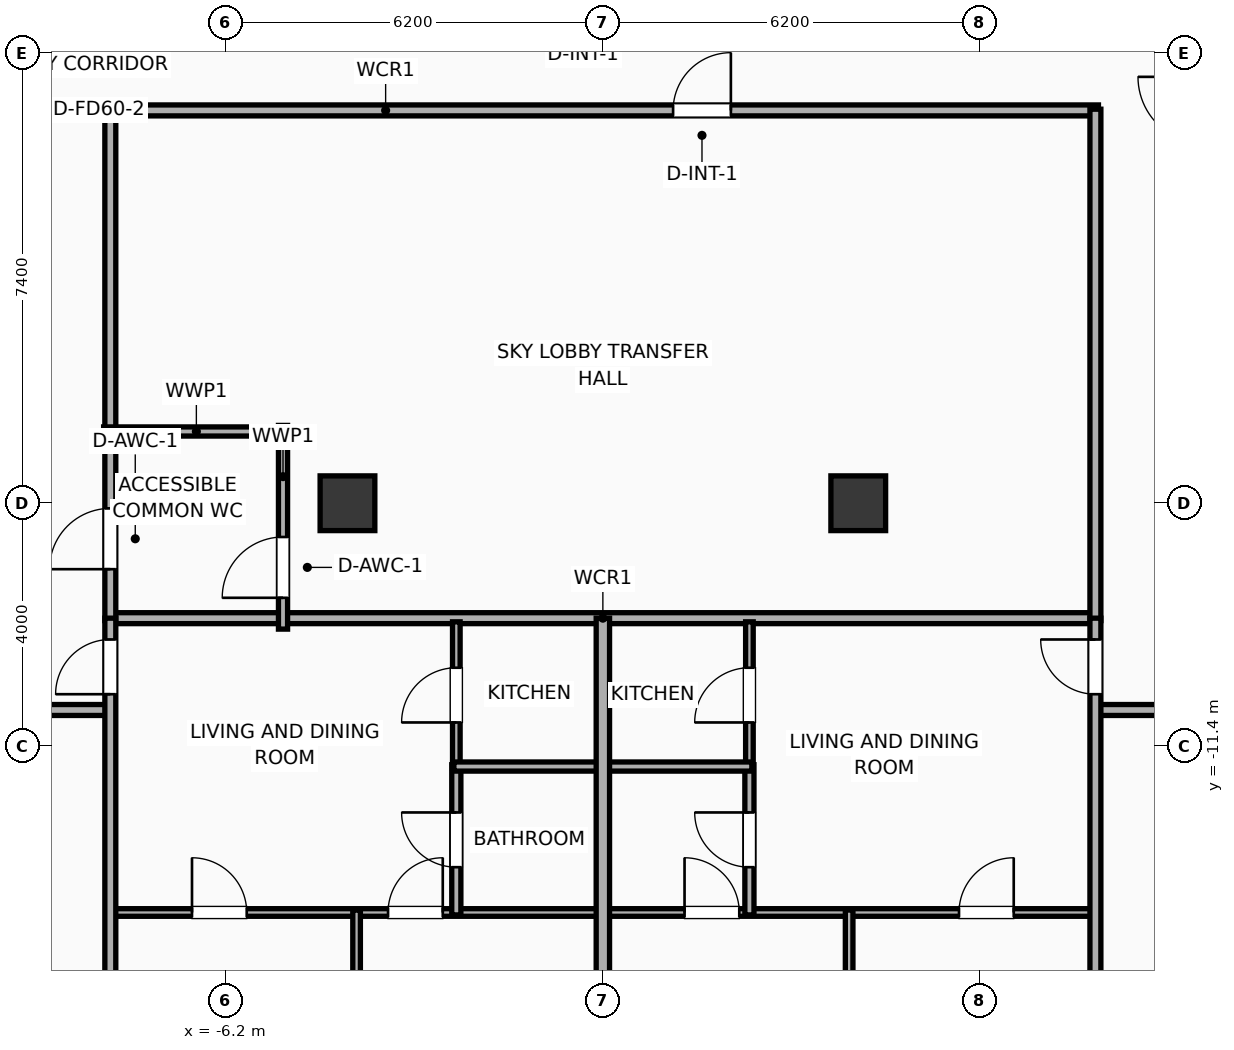
"""IFC4 building model, lengths in metres.
Left out: names, types, materials, properties, quantities, classifications, styles, units other than length and angle.
Written with IfcOpenShell. Run it as: python <this file> out.ifc"""

import sys

from ifc_helpers import new_model, si_unit, direction, frame, frame_2d, origin, origin_2d, place, context, subcontext, project, spatial, rectangle, extrude, element, fill, save


model = new_model("IFC4")
c1 = context("Model", 3, precision=1e-05, world=origin(), true_north=direction((0.0, 1.0)))
c2 = subcontext(c1, "Body", "Model", "MODEL_VIEW")
j1 = project(units=[si_unit("LENGTHUNIT", "METRE"), si_unit("PLANEANGLEUNIT", "RADIAN")], contexts=[c1])
p1 = place(None, origin())
s1 = spatial("IfcSite", under=j1, at=p1, CompositionType="ELEMENT")
p2 = place(p1, origin())
s2 = spatial("IfcBuilding", under=s1, at=p2, CompositionType="ELEMENT")
p3 = place(p2, frame((0.0, 0.0, 140.4)))
s3 = spatial("IfcBuildingStorey", under=s2, at=p3, CompositionType="ELEMENT", Elevation=140.4)
for number, where, z_axis, x_axis in (
    (1, (-4.2, -7.4, 0.0), (0.0, 0.0, 1.0), (1.0, 0.0, 0.0)),
    (2, (4.2, -7.4, 0.0), (0.0, 0.0, 1.0), (1.0, 0.0, 0.0)),
):
    element("IfcColumn", number, at=place(p3, frame(where, z_axis=z_axis, x_axis=x_axis)), inside=s3, PredefinedType="COLUMN", context=c2, shape_type="SweptSolid", body=[
        extrude(rectangle(XDim=0.9, YDim=0.9, at=origin_2d()), origin(), (0.0, 0.0, 1.0), 3.9),
    ])
p4 = place(p3, frame((-8.15, -9.29, 0.0), z_axis=(0.0, 0.0, 1.0), x_axis=(1.0, 0.0, 0.0)))
e3 = element("IfcWall", 3, at=p4, inside=s3, PredefinedType="PARTITIONING", context=c2, shape_type="SweptSolid", body=[
    extrude(rectangle(XDim=16.3, YDim=0.18, at=frame_2d((8.15, 0.0))), origin(), (0.0, 0.0, 1.0), 3.65),
])
p5 = place(p3, frame((-8.15, -0.94, 0.0), z_axis=(0.0, 0.0, 1.0), x_axis=(1.0, 0.0, 0.0)))
e4 = element("IfcWall", 4, at=p5, inside=s3, PredefinedType="PARTITIONING", context=c2, shape_type="SweptSolid", body=[
    extrude(rectangle(XDim=16.3, YDim=0.18, at=frame_2d((8.15, 0.0))), origin(), (0.0, 0.0, 1.0), 3.65),
])
p6 = place(p5, frame((9.305, 0.0, 0.0)))
e5 = element("IfcOpeningElement", 5, at=p6, cuts=e4, PredefinedType="OPENING", context=c2, shape_type="SweptSolid", body=[
    extrude(rectangle(XDim=0.95, YDim=2.05, at=frame_2d((0.475, 1.025))), frame((0.0, 0.1, 0.0), z_axis=(0.0, -1.0, 0.0), x_axis=(1.0, 0.0, 0.0)), (0.0, 0.0, 1.0), 0.2),
])
p7 = place(p3, frame((-8.1, -9.33, 0.0), z_axis=(0.0, 0.0, 1.0), x_axis=(0.0, 1.0, 0.0)))
e6 = element("IfcWall", 6, at=p7, inside=s3, PredefinedType="PARTITIONING", context=c2, shape_type="SweptSolid", body=[
    extrude(rectangle(XDim=8.41, YDim=0.18, at=frame_2d((4.205, 0.0))), origin(), (0.0, 0.0, 1.0), 3.65),
])
p8 = place(p7, frame((0.846, 0.0, 0.0)))
e7 = element("IfcOpeningElement", 7, at=p8, cuts=e6, PredefinedType="OPENING", context=c2, shape_type="SweptSolid", body=[
    extrude(rectangle(XDim=1.0, YDim=2.05, at=frame_2d((0.5, 1.025))), frame((0.0, 0.1, 0.0), z_axis=(0.0, -1.0, 0.0), x_axis=(1.0, 0.0, 0.0)), (0.0, 0.0, 1.0), 0.2),
])
p9 = place(p3, frame((8.1, -9.33, 0.0), z_axis=(0.0, 0.0, 1.0), x_axis=(0.0, 1.0, 0.0)))
e8 = element("IfcWall", 8, at=p9, inside=s3, PredefinedType="PARTITIONING", context=c2, shape_type="SweptSolid", body=[
    extrude(rectangle(XDim=8.41, YDim=0.18, at=frame_2d((4.205, 0.0))), origin(), (0.0, 0.0, 1.0), 3.65),
])
p10 = place(p3, frame((-5.26, -9.47, 0.0), z_axis=(0.0, 0.0, 1.0), x_axis=(0.0, 1.0, 0.0)))
e9 = element("IfcWall", 9, at=p10, inside=s3, PredefinedType="PLUMBINGWALL", context=c2, shape_type="SweptSolid", body=[
    extrude(rectangle(XDim=3.35, YDim=0.15, at=frame_2d((1.675, 0.0))), origin(), (0.0, 0.0, 1.0), 3.65),
])
p11 = place(p10, frame((0.515, 0.0, 0.0)))
e10 = element("IfcOpeningElement", 10, at=p11, cuts=e9, PredefinedType="OPENING", context=c2, shape_type="SweptSolid", body=[
    extrude(rectangle(XDim=1.0, YDim=2.05, at=frame_2d((0.5, 1.025))), frame((0.0, 0.085, 0.0), z_axis=(0.0, -1.0, 0.0), x_axis=(1.0, 0.0, 0.0)), (0.0, 0.0, 1.0), 0.17),
])
p12 = place(p3, frame((-8.21, -6.22, 0.0), z_axis=(0.0, 0.0, 1.0), x_axis=(1.0, 0.0, 0.0)))
e11 = element("IfcWall", 11, at=p12, inside=s3, PredefinedType="PLUMBINGWALL", context=c2, shape_type="SweptSolid", body=[
    extrude(rectangle(XDim=3.05, YDim=0.15, at=frame_2d((1.525, 0.0))), origin(), (0.0, 0.0, 1.0), 3.65),
])
p13 = place(p3, frame((-20.0, -10.8, 0.0), z_axis=(0.0, 0.0, 1.0), x_axis=(1.0, 0.0, 0.0)))
e12 = element("IfcWall", 12, at=p13, inside=s3, PredefinedType="PARTITIONING", context=c2, shape_type="SweptSolid", body=[
    extrude(rectangle(XDim=11.92, YDim=0.18, at=frame_2d((5.96, 0.0))), origin(), (0.0, 0.0, 1.0), 3.65),
])
p14 = place(p13, frame((2.705, 0.0, 0.0)))
e13 = element("IfcOpeningElement", 13, at=p14, cuts=e12, PredefinedType="OPENING", context=c2, shape_type="SweptSolid", body=[
    extrude(rectangle(XDim=0.9, YDim=2.05, at=frame_2d((0.45, 1.025))), frame((0.0, 0.1, 0.0), z_axis=(0.0, -1.0, 0.0), x_axis=(1.0, 0.0, 0.0)), (0.0, 0.0, 1.0), 0.2),
])
p15 = place(p13, frame((9.618, 0.0, 0.0)))
e14 = element("IfcOpeningElement", 14, at=p15, cuts=e12, PredefinedType="OPENING", context=c2, shape_type="SweptSolid", body=[
    extrude(rectangle(XDim=1.15, YDim=2.05, at=frame_2d((0.575, 1.025))), frame((0.0, 0.1, 0.0), z_axis=(0.0, -1.0, 0.0), x_axis=(1.0, 0.0, 0.0)), (0.0, 0.0, 1.0), 0.2),
])
p16 = place(p3, frame((8.08, -10.8, 0.0), z_axis=(0.0, 0.0, 1.0), x_axis=(1.0, 0.0, 0.0)))
e15 = element("IfcWall", 15, at=p16, inside=s3, PredefinedType="PARTITIONING", context=c2, shape_type="SweptSolid", body=[
    extrude(rectangle(XDim=11.92, YDim=0.18, at=frame_2d((5.96, 0.0))), origin(), (0.0, 0.0, 1.0), 3.65),
])
p17 = place(p16, frame((1.251, 0.0, 0.0)))
e16 = element("IfcOpeningElement", 16, at=p17, cuts=e15, PredefinedType="OPENING", context=c2, shape_type="SweptSolid", body=[
    extrude(rectangle(XDim=1.15, YDim=2.05, at=frame_2d((0.575, 1.025))), frame((0.0, 0.1, 0.0), z_axis=(0.0, -1.0, 0.0), x_axis=(1.0, 0.0, 0.0)), (0.0, 0.0, 1.0), 0.2),
])
p18 = place(p16, frame((7.244, 0.0, 0.0)))
e17 = element("IfcOpeningElement", 17, at=p18, cuts=e15, PredefinedType="OPENING", context=c2, shape_type="SweptSolid", body=[
    extrude(rectangle(XDim=1.15, YDim=2.05, at=frame_2d((0.575, 1.025))), frame((0.0, 0.1, 0.0), z_axis=(0.0, -1.0, 0.0), x_axis=(1.0, 0.0, 0.0)), (0.0, 0.0, 1.0), 0.2),
])
p19 = place(p3, frame((-8.08, -14.13, 0.0), z_axis=(0.0, 0.0, 1.0), x_axis=(1.0, 0.0, 0.0)))
e18 = element("IfcWall", 18, at=p19, inside=s3, PredefinedType="PARTITIONING", context=c2, shape_type="SweptSolid", body=[
    extrude(rectangle(XDim=8.06, YDim=0.125, at=frame_2d((4.03, 0.0))), origin(), (0.0, 0.0, 1.0), 3.65),
])
p20 = place(p19, frame((1.323, 0.0, 0.0)))
e19 = element("IfcOpeningElement", 19, at=p20, cuts=e18, PredefinedType="OPENING", context=c2, shape_type="SweptSolid", body=[
    extrude(rectangle(XDim=0.9, YDim=2.05, at=frame_2d((0.45, 1.025))), frame((0.0, 0.073, 0.0), z_axis=(0.0, -1.0, 0.0), x_axis=(1.0, 0.0, 0.0)), (0.0, 0.0, 1.0), 0.145),
])
p21 = place(p19, frame((4.547, 0.0, 0.0)))
e20 = element("IfcOpeningElement", 20, at=p21, cuts=e18, PredefinedType="OPENING", context=c2, shape_type="SweptSolid", body=[
    extrude(rectangle(XDim=0.9, YDim=2.05, at=frame_2d((0.45, 1.025))), frame((0.0, 0.073, 0.0), z_axis=(0.0, -1.0, 0.0), x_axis=(1.0, 0.0, 0.0)), (0.0, 0.0, 1.0), 0.145),
])
p22 = place(p3, frame((-2.41, -11.76, 0.0), z_axis=(0.0, 0.0, 1.0), x_axis=(0.0, 1.0, 0.0)))
e21 = element("IfcWall", 21, at=p22, inside=s3, PredefinedType="PARTITIONING", context=c2, shape_type="SweptSolid", body=[
    extrude(rectangle(XDim=2.41, YDim=0.125, at=frame_2d((1.205, 0.0))), origin(), (0.0, 0.0, 1.0), 3.65),
])
p23 = place(p22, frame((0.755, 0.0, 0.0)))
e22 = element("IfcOpeningElement", 22, at=p23, cuts=e21, PredefinedType="OPENING", context=c2, shape_type="SweptSolid", body=[
    extrude(rectangle(XDim=0.9, YDim=2.05, at=frame_2d((0.45, 1.025))), frame((0.0, 0.073, 0.0), z_axis=(0.0, -1.0, 0.0), x_axis=(1.0, 0.0, 0.0)), (0.0, 0.0, 1.0), 0.145),
])
p24 = place(p3, frame((-2.41, -14.17, 0.0), z_axis=(0.0, 0.0, 1.0), x_axis=(0.0, 1.0, 0.0)))
e23 = element("IfcWall", 23, at=p24, inside=s3, PredefinedType="PLUMBINGWALL", context=c2, shape_type="SweptSolid", body=[
    extrude(rectangle(XDim=2.47, YDim=0.15, at=frame_2d((1.235, 0.0))), origin(), (0.0, 0.0, 1.0), 3.65),
])
p25 = place(p24, frame((0.785, 0.0, 0.0)))
e24 = element("IfcOpeningElement", 24, at=p25, cuts=e23, PredefinedType="OPENING", context=c2, shape_type="SweptSolid", body=[
    extrude(rectangle(XDim=0.9, YDim=2.05, at=frame_2d((0.45, 1.025))), frame((0.0, 0.085, 0.0), z_axis=(0.0, -1.0, 0.0), x_axis=(1.0, 0.0, 0.0)), (0.0, 0.0, 1.0), 0.17),
])
p26 = place(p3, frame((-2.45, -11.73, 0.0), z_axis=(0.0, 0.0, 1.0), x_axis=(1.0, 0.0, 0.0)))
e25 = element("IfcWall", 25, at=p26, inside=s3, PredefinedType="PLUMBINGWALL", context=c2, shape_type="SweptSolid", body=[
    extrude(rectangle(XDim=2.43, YDim=0.15, at=frame_2d((1.215, 0.0))), origin(), (0.0, 0.0, 1.0), 3.65),
])
p27 = place(p3, frame((-4.05, -21.031, 0.0), z_axis=(0.0, 0.0, 1.0), x_axis=(0.0, 1.0, 0.0)))
e26 = element("IfcWall", 26, at=p27, inside=s3, PredefinedType="PARTITIONING", context=c2, shape_type="SweptSolid", body=[
    extrude(rectangle(XDim=6.941, YDim=0.125, at=frame_2d((3.47, 0.0))), origin(), (0.0, 0.0, 1.0), 3.65),
])
p28 = place(p3, frame((-8.1, -21.456, 0.0), z_axis=(0.0, 0.0, 1.0), x_axis=(0.0, 1.0, 0.0)))
e27 = element("IfcWall", 27, at=p28, inside=s3, PredefinedType="PARTITIONING", context=c2, shape_type="SweptSolid", body=[
    extrude(rectangle(XDim=12.166, YDim=0.18, at=frame_2d((6.083, 0.0))), origin(), (0.0, 0.0, 1.0), 3.65),
])
p29 = place(p28, frame((10.916, 0.0, 0.0)))
e28 = element("IfcOpeningElement", 28, at=p29, cuts=e27, PredefinedType="OPENING", context=c2, shape_type="SweptSolid", body=[
    extrude(rectangle(XDim=0.9, YDim=2.05, at=frame_2d((0.45, 1.025))), frame((0.0, 0.1, 0.0), z_axis=(0.0, -1.0, 0.0), x_axis=(1.0, 0.0, 0.0)), (0.0, 0.0, 1.0), 0.2),
])
p30 = place(p3, frame((0.02, -14.13, 0.0), z_axis=(0.0, 0.0, 1.0), x_axis=(1.0, 0.0, 0.0)))
e29 = element("IfcWall", 29, at=p30, inside=s3, PredefinedType="PARTITIONING", context=c2, shape_type="SweptSolid", body=[
    extrude(rectangle(XDim=8.06, YDim=0.125, at=frame_2d((4.03, 0.0))), origin(), (0.0, 0.0, 1.0), 3.65),
])
p31 = place(p30, frame((1.323, 0.0, 0.0)))
e30 = element("IfcOpeningElement", 30, at=p31, cuts=e29, PredefinedType="OPENING", context=c2, shape_type="SweptSolid", body=[
    extrude(rectangle(XDim=0.9, YDim=2.05, at=frame_2d((0.45, 1.025))), frame((0.0, 0.073, 0.0), z_axis=(0.0, -1.0, 0.0), x_axis=(1.0, 0.0, 0.0)), (0.0, 0.0, 1.0), 0.145),
])
p32 = place(p30, frame((5.837, 0.0, 0.0)))
e31 = element("IfcOpeningElement", 31, at=p32, cuts=e29, PredefinedType="OPENING", context=c2, shape_type="SweptSolid", body=[
    extrude(rectangle(XDim=0.9, YDim=2.05, at=frame_2d((0.45, 1.025))), frame((0.0, 0.073, 0.0), z_axis=(0.0, -1.0, 0.0), x_axis=(1.0, 0.0, 0.0)), (0.0, 0.0, 1.0), 0.145),
])
p33 = place(p3, frame((2.41, -11.76, 0.0), z_axis=(0.0, 0.0, 1.0), x_axis=(0.0, 1.0, 0.0)))
e32 = element("IfcWall", 32, at=p33, inside=s3, PredefinedType="PARTITIONING", context=c2, shape_type="SweptSolid", body=[
    extrude(rectangle(XDim=2.41, YDim=0.125, at=frame_2d((1.205, 0.0))), origin(), (0.0, 0.0, 1.0), 3.65),
])
p34 = place(p33, frame((0.755, 0.0, 0.0)))
e33 = element("IfcOpeningElement", 33, at=p34, cuts=e32, PredefinedType="OPENING", context=c2, shape_type="SweptSolid", body=[
    extrude(rectangle(XDim=0.9, YDim=2.05, at=frame_2d((0.45, 1.025))), frame((0.0, 0.073, 0.0), z_axis=(0.0, -1.0, 0.0), x_axis=(1.0, 0.0, 0.0)), (0.0, 0.0, 1.0), 0.145),
])
p35 = place(p3, frame((2.41, -14.17, 0.0), z_axis=(0.0, 0.0, 1.0), x_axis=(0.0, 1.0, 0.0)))
e34 = element("IfcWall", 34, at=p35, inside=s3, PredefinedType="PLUMBINGWALL", context=c2, shape_type="SweptSolid", body=[
    extrude(rectangle(XDim=2.47, YDim=0.15, at=frame_2d((1.235, 0.0))), origin(), (0.0, 0.0, 1.0), 3.65),
])
p36 = place(p35, frame((0.785, 0.0, 0.0)))
e35 = element("IfcOpeningElement", 35, at=p36, cuts=e34, PredefinedType="OPENING", context=c2, shape_type="SweptSolid", body=[
    extrude(rectangle(XDim=0.9, YDim=2.05, at=frame_2d((0.45, 1.025))), frame((0.0, 0.085, 0.0), z_axis=(0.0, -1.0, 0.0), x_axis=(1.0, 0.0, 0.0)), (0.0, 0.0, 1.0), 0.17),
])
p37 = place(p3, frame((0.02, -11.73, 0.0), z_axis=(0.0, 0.0, 1.0), x_axis=(1.0, 0.0, 0.0)))
e36 = element("IfcWall", 36, at=p37, inside=s3, PredefinedType="PLUMBINGWALL", context=c2, shape_type="SweptSolid", body=[
    extrude(rectangle(XDim=2.43, YDim=0.15, at=frame_2d((1.215, 0.0))), origin(), (0.0, 0.0, 1.0), 3.65),
])
p38 = place(p3, frame((4.05, -20.179, 0.0), z_axis=(0.0, 0.0, 1.0), x_axis=(0.0, 1.0, 0.0)))
e37 = element("IfcWall", 37, at=p38, inside=s3, PredefinedType="PARTITIONING", context=c2, shape_type="SweptSolid", body=[
    extrude(rectangle(XDim=6.089, YDim=0.125, at=frame_2d((3.045, 0.0))), origin(), (0.0, 0.0, 1.0), 2.54),
])
p39 = place(p3, frame((8.1, -19.754, 0.0), z_axis=(0.0, 0.0, 1.0), x_axis=(0.0, 1.0, 0.0)))
e38 = element("IfcWall", 38, at=p39, inside=s3, PredefinedType="PARTITIONING", context=c2, shape_type="SweptSolid", body=[
    extrude(rectangle(XDim=10.464, YDim=0.18, at=frame_2d((5.232, 0.0))), origin(), (0.0, 0.0, 1.0), 3.65),
])
p40 = place(p39, frame((9.213, 0.0, 0.0)))
e39 = element("IfcOpeningElement", 39, at=p40, cuts=e38, PredefinedType="OPENING", context=c2, shape_type="SweptSolid", body=[
    extrude(rectangle(XDim=0.9, YDim=2.05, at=frame_2d((0.45, 1.025))), frame((0.0, 0.1, 0.0), z_axis=(0.0, -1.0, 0.0), x_axis=(1.0, 0.0, 0.0)), (0.0, 0.0, 1.0), 0.2),
])
p41 = place(p3, frame((0.0, -20.605, 0.0), z_axis=(0.0, 0.0, 1.0), x_axis=(0.0, 1.0, 0.0)))
e40 = element("IfcWall", 40, at=p41, inside=s3, PredefinedType="PARTITIONING", context=c2, shape_type="SweptSolid", body=[
    extrude(rectangle(XDim=11.315, YDim=0.22, at=frame_2d((5.657, 0.0))), origin(), (0.0, 0.0, 1.0), 3.65),
])
p42 = place(p6, origin())
e41 = element("IfcDoor", 41, at=p42, inside=s3, OperationType="SINGLE_SWING_RIGHT", PredefinedType="DOOR", context=c2, shape_type="SweptSolid", body=[
    extrude(rectangle(XDim=0.95, YDim=2.05, at=frame_2d((0.475, 1.025))), frame((0.0, 0.025, 0.0), z_axis=(0.0, -1.0, 0.0), x_axis=(1.0, 0.0, 0.0)), (0.0, 0.0, 1.0), 0.05),
])
fill(e5, e41)
p43 = place(p8, origin())
e42 = element("IfcDoor", 42, at=p43, inside=s3, OperationType="SINGLE_SWING_LEFT", PredefinedType="DOOR", context=c2, shape_type="SweptSolid", body=[
    extrude(rectangle(XDim=1.0, YDim=2.05, at=frame_2d((0.5, 1.025))), frame((0.0, 0.025, 0.0), z_axis=(0.0, -1.0, 0.0), x_axis=(1.0, 0.0, 0.0)), (0.0, 0.0, 1.0), 0.05),
])
fill(e7, e42)
p44 = place(p11, origin())
e43 = element("IfcDoor", 43, at=p44, inside=s3, OperationType="SINGLE_SWING_LEFT", PredefinedType="DOOR", context=c2, shape_type="SweptSolid", body=[
    extrude(rectangle(XDim=1.0, YDim=2.05, at=frame_2d((0.5, 1.025))), frame((0.0, 0.025, 0.0), z_axis=(0.0, -1.0, 0.0), x_axis=(1.0, 0.0, 0.0)), (0.0, 0.0, 1.0), 0.05),
])
fill(e10, e43)
p45 = place(p20, origin())
e44 = element("IfcDoor", 44, at=p45, inside=s3, OperationType="SINGLE_SWING_LEFT", PredefinedType="DOOR", context=c2, shape_type="SweptSolid", body=[
    extrude(rectangle(XDim=0.9, YDim=2.05, at=frame_2d((0.45, 1.025))), frame((0.0, 0.025, 0.0), z_axis=(0.0, -1.0, 0.0), x_axis=(1.0, 0.0, 0.0)), (0.0, 0.0, 1.0), 0.05),
])
fill(e19, e44)
p46 = place(p21, origin())
e45 = element("IfcDoor", 45, at=p46, inside=s3, OperationType="SINGLE_SWING_RIGHT", PredefinedType="DOOR", context=c2, shape_type="SweptSolid", body=[
    extrude(rectangle(XDim=0.9, YDim=2.05, at=frame_2d((0.45, 1.025))), frame((0.0, 0.025, 0.0), z_axis=(0.0, -1.0, 0.0), x_axis=(1.0, 0.0, 0.0)), (0.0, 0.0, 1.0), 0.05),
])
fill(e20, e45)
p47 = place(p23, origin())
e46 = element("IfcDoor", 46, at=p47, inside=s3, OperationType="SINGLE_SWING_LEFT", PredefinedType="DOOR", context=c2, shape_type="SweptSolid", body=[
    extrude(rectangle(XDim=0.9, YDim=2.05, at=frame_2d((0.45, 1.025))), frame((0.0, 0.025, 0.0), z_axis=(0.0, -1.0, 0.0), x_axis=(1.0, 0.0, 0.0)), (0.0, 0.0, 1.0), 0.05),
])
fill(e22, e46)
p48 = place(p25, origin())
e47 = element("IfcDoor", 47, at=p48, inside=s3, OperationType="SINGLE_SWING_RIGHT", PredefinedType="DOOR", context=c2, shape_type="SweptSolid", body=[
    extrude(rectangle(XDim=0.9, YDim=2.05, at=frame_2d((0.45, 1.025))), frame((0.0, 0.025, 0.0), z_axis=(0.0, -1.0, 0.0), x_axis=(1.0, 0.0, 0.0)), (0.0, 0.0, 1.0), 0.05),
])
fill(e24, e47)
p49 = place(p29, origin())
e48 = element("IfcDoor", 48, at=p49, inside=s3, OperationType="SINGLE_SWING_LEFT", PredefinedType="DOOR", context=c2, shape_type="SweptSolid", body=[
    extrude(rectangle(XDim=0.9, YDim=2.05, at=frame_2d((0.45, 1.025))), frame((0.0, 0.025, 0.0), z_axis=(0.0, -1.0, 0.0), x_axis=(1.0, 0.0, 0.0)), (0.0, 0.0, 1.0), 0.05),
])
fill(e28, e48)
p50 = place(p31, origin())
e49 = element("IfcDoor", 49, at=p50, inside=s3, OperationType="SINGLE_SWING_LEFT", PredefinedType="DOOR", context=c2, shape_type="SweptSolid", body=[
    extrude(rectangle(XDim=0.9, YDim=2.05, at=frame_2d((0.45, 1.025))), frame((0.0, 0.025, 0.0), z_axis=(0.0, -1.0, 0.0), x_axis=(1.0, 0.0, 0.0)), (0.0, 0.0, 1.0), 0.05),
])
fill(e30, e49)
p51 = place(p32, origin())
e50 = element("IfcDoor", 50, at=p51, inside=s3, OperationType="SINGLE_SWING_RIGHT", PredefinedType="DOOR", context=c2, shape_type="SweptSolid", body=[
    extrude(rectangle(XDim=0.9, YDim=2.05, at=frame_2d((0.45, 1.025))), frame((0.0, 0.025, 0.0), z_axis=(0.0, -1.0, 0.0), x_axis=(1.0, 0.0, 0.0)), (0.0, 0.0, 1.0), 0.05),
])
fill(e31, e50)
p52 = place(p34, origin())
e51 = element("IfcDoor", 51, at=p52, inside=s3, OperationType="SINGLE_SWING_LEFT", PredefinedType="DOOR", context=c2, shape_type="SweptSolid", body=[
    extrude(rectangle(XDim=0.9, YDim=2.05, at=frame_2d((0.45, 1.025))), frame((0.0, 0.025, 0.0), z_axis=(0.0, -1.0, 0.0), x_axis=(1.0, 0.0, 0.0)), (0.0, 0.0, 1.0), 0.05),
])
fill(e33, e51)
p53 = place(p36, origin())
e52 = element("IfcDoor", 52, at=p53, inside=s3, OperationType="SINGLE_SWING_RIGHT", PredefinedType="DOOR", context=c2, shape_type="SweptSolid", body=[
    extrude(rectangle(XDim=0.9, YDim=2.05, at=frame_2d((0.45, 1.025))), frame((0.0, 0.025, 0.0), z_axis=(0.0, -1.0, 0.0), x_axis=(1.0, 0.0, 0.0)), (0.0, 0.0, 1.0), 0.05),
])
fill(e35, e52)
p54 = place(p40, origin())
e53 = element("IfcDoor", 53, at=p54, inside=s3, OperationType="SINGLE_SWING_RIGHT", PredefinedType="DOOR", context=c2, shape_type="SweptSolid", body=[
    extrude(rectangle(XDim=0.9, YDim=2.05, at=frame_2d((0.45, 1.025))), frame((0.0, 0.025, 0.0), z_axis=(0.0, -1.0, 0.0), x_axis=(1.0, 0.0, 0.0)), (0.0, 0.0, 1.0), 0.05),
])
fill(e39, e53)
save(model, sys.argv[1])
